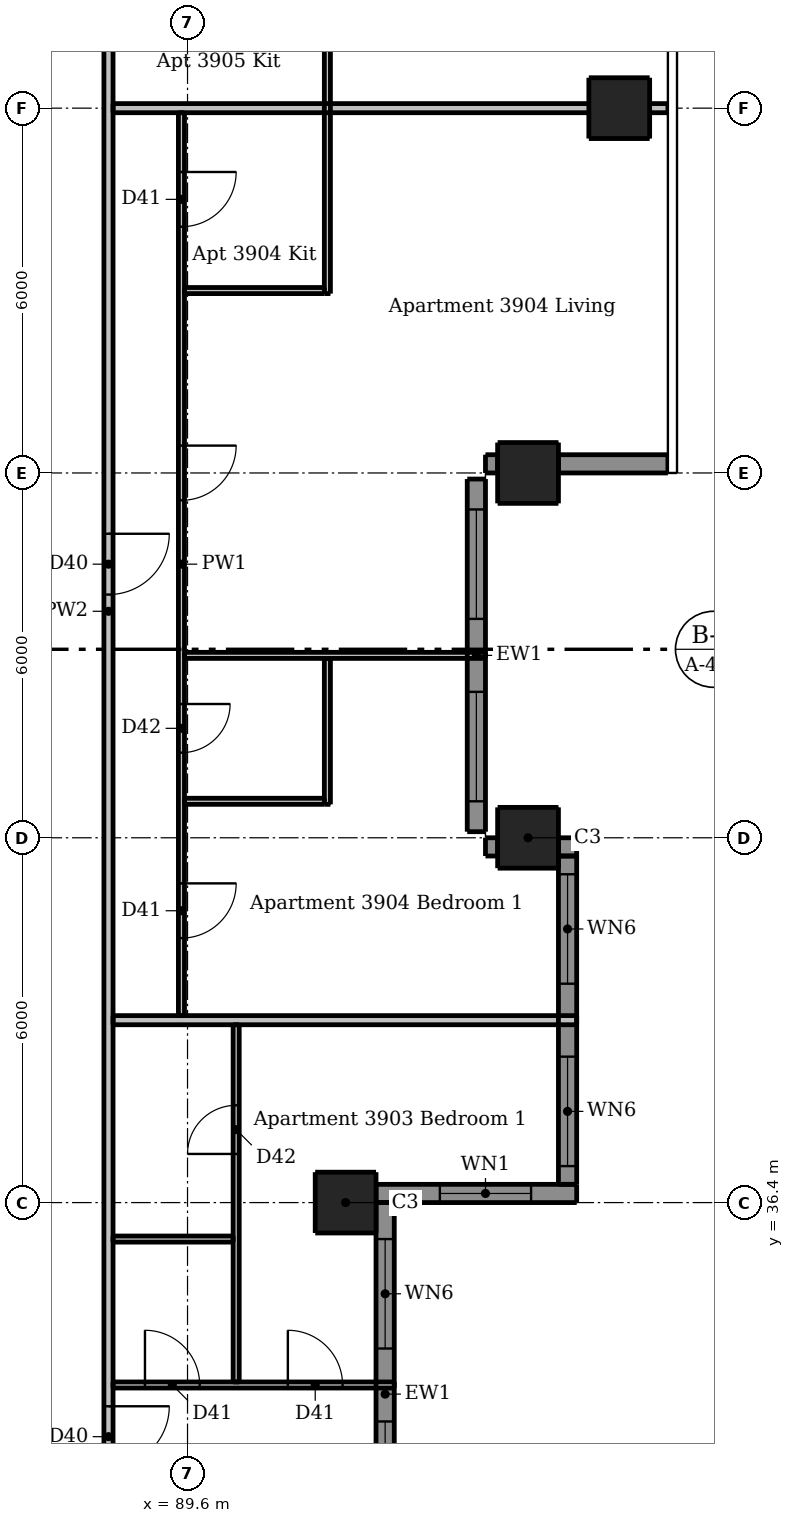
"""IFC4 building model, lengths in metres.
Left out: names, types, materials, properties, quantities, classifications, styles, units other than length and angle.
Written with IfcOpenShell. Run it as: python <this file> out.ifc"""

import sys

from ifc_helpers import new_model, si_unit, direction, frame, frame_2d, origin, origin_2d, place, context, subcontext, project, spatial, rectangle, extrude, element, fill, save


model = new_model("IFC4")
c1 = context("Model", 3, precision=1e-05, world=origin(), true_north=direction((0.0, 1.0)))
c2 = subcontext(c1, "Body", "Model", "MODEL_VIEW")
j1 = project(units=[si_unit("LENGTHUNIT", "METRE"), si_unit("PLANEANGLEUNIT", "RADIAN")], contexts=[c1])
p1 = place(None, origin())
s1 = spatial("IfcSite", under=j1, at=p1, CompositionType="ELEMENT")
p2 = place(p1, origin())
s2 = spatial("IfcBuilding", under=s1, at=p2, CompositionType="ELEMENT")
p3 = place(p2, frame((0.0, 0.0, 147.1)))
s3 = spatial("IfcBuildingStorey", under=s2, at=p3, CompositionType="ELEMENT", Elevation=147.1)
p4 = place(p3, frame((92.2, 36.4, 0.0), z_axis=(0.0, 0.0, 1.0), x_axis=(1.0, 0.0, 0.0)))
e1 = element("IfcColumn", 1, at=p4, inside=s3, PredefinedType="COLUMN", context=c2, shape_type="SweptSolid", body=[
    extrude(rectangle(XDim=1.0, YDim=1.0, at=origin_2d()), origin(), (0.0, 0.0, 1.0), 3.0),
])
p5 = place(p3, frame((95.2, 42.4, 0.0), z_axis=(0.0, 0.0, 1.0), x_axis=(1.0, 0.0, 0.0)))
e2 = element("IfcColumn", 2, at=p5, inside=s3, PredefinedType="COLUMN", context=c2, shape_type="SweptSolid", body=[
    extrude(rectangle(XDim=1.0, YDim=1.0, at=origin_2d()), origin(), (0.0, 0.0, 1.0), 3.3),
])
for number, where, z_axis, x_axis in (
    (3, (95.2, 48.4, 0.0), (0.0, 0.0, 1.0), (1.0, 0.0, 0.0)),
    (4, (96.7, 54.4, 0.0), (0.0, 0.0, 1.0), (1.0, 0.0, 0.0)),
):
    element("IfcColumn", number, at=place(p3, frame(where, z_axis=z_axis, x_axis=x_axis)), inside=s3, PredefinedType="COLUMN", context=c2, shape_type="SweptSolid", body=[
        extrude(rectangle(XDim=1.0, YDim=1.0, at=origin_2d()), origin(), (0.0, 0.0, 1.0), 3.0),
    ])
p6 = place(p3, frame((92.7, 36.55, 0.0), z_axis=(0.0, 0.0, 1.0), x_axis=(1.0, 0.0, 0.0)))
e5 = element("IfcWall", 5, at=p6, inside=s3, PredefinedType="SOLIDWALL", context=c2, shape_type="SweptSolid", body=[
    extrude(rectangle(XDim=3.3, YDim=0.3, at=frame_2d((1.65, 0.0))), origin(), (0.0, 0.0, 1.0), 3.0),
])
p7 = place(p6, frame((1.05, 0.0, 0.9)))
e6 = element("IfcOpeningElement", 6, at=p7, cuts=e5, PredefinedType="OPENING", context=c2, shape_type="SweptSolid", body=[
    extrude(rectangle(XDim=1.5, YDim=1.5, at=frame_2d((0.75, 0.75))), frame((0.0, 0.16, 0.0), z_axis=(0.0, -1.0, 0.0), x_axis=(1.0, 0.0, 0.0)), (0.0, 0.0, 1.0), 0.32),
])
p8 = place(p3, frame((96.0, 42.25, 0.0), z_axis=(0.0, 0.0, 1.0), x_axis=(-1.0, 0.0, 0.0)))
e7 = element("IfcWall", 7, at=p8, inside=s3, PredefinedType="SOLIDWALL", context=c2, shape_type="SweptSolid", body=[
    extrude(rectangle(XDim=0.3, YDim=0.3, at=frame_2d((0.15, 0.0))), origin(), (0.0, 0.0, 1.0), 3.0),
])
for number, where, z_axis, x_axis in (
    (8, (94.7, 42.25, 0.0), (0.0, 0.0, 1.0), (-1.0, 0.0, 0.0)),
    (9, (94.5, 48.55, 0.0), (0.0, 0.0, 1.0), (1.0, 0.0, 0.0)),
):
    element("IfcWall", number, at=place(p3, frame(where, z_axis=z_axis, x_axis=x_axis)), inside=s3, PredefinedType="SOLIDWALL", context=c2, shape_type="SweptSolid", body=[
        extrude(rectangle(XDim=0.2, YDim=0.3, at=frame_2d((0.1, 0.0))), origin(), (0.0, 0.0, 1.0), 3.0),
    ])
p9 = place(p3, frame((95.7, 48.55, 0.0), z_axis=(0.0, 0.0, 1.0), x_axis=(1.0, 0.0, 0.0)))
e10 = element("IfcWall", 10, at=p9, inside=s3, PredefinedType="SOLIDWALL", context=c2, shape_type="SweptSolid", body=[
    extrude(rectangle(XDim=1.8, YDim=0.3, at=frame_2d((0.9, 0.0))), origin(), (0.0, 0.0, 1.0), 3.0),
])
p10 = place(p3, frame((92.85, 30.1, 0.0), z_axis=(0.0, 0.0, 1.0), x_axis=(0.0, 1.0, 0.0)))
e11 = element("IfcWall", 11, at=p10, inside=s3, PredefinedType="SOLIDWALL", context=c2, shape_type="SweptSolid", body=[
    extrude(rectangle(XDim=6.3, YDim=0.3, at=frame_2d((3.15, 0.0))), origin(), (0.0, 0.0, 1.0), 3.0),
])
p11 = place(p10, frame((0.9, 0.0, 0.15)))
e12 = element("IfcOpeningElement", 12, at=p11, cuts=e11, PredefinedType="OPENING", context=c2, shape_type="SweptSolid", body=[
    extrude(rectangle(XDim=1.8, YDim=2.1, at=frame_2d((0.9, 1.05))), frame((0.0, 0.16, 0.0), z_axis=(0.0, -1.0, 0.0), x_axis=(1.0, 0.0, 0.0)), (0.0, 0.0, 1.0), 0.32),
])
p12 = place(p10, frame((3.9, 0.0, 0.15)))
e13 = element("IfcOpeningElement", 13, at=p12, cuts=e11, PredefinedType="OPENING", context=c2, shape_type="SweptSolid", body=[
    extrude(rectangle(XDim=1.8, YDim=2.1, at=frame_2d((0.9, 1.05))), frame((0.0, 0.16, 0.0), z_axis=(0.0, -1.0, 0.0), x_axis=(1.0, 0.0, 0.0)), (0.0, 0.0, 1.0), 0.32),
])
p13 = place(p3, frame((95.85, 36.7, 0.0), z_axis=(0.0, 0.0, 1.0), x_axis=(0.0, 1.0, 0.0)))
e14 = element("IfcWall", 14, at=p13, inside=s3, PredefinedType="SOLIDWALL", context=c2, shape_type="SweptSolid", body=[
    extrude(rectangle(XDim=5.4, YDim=0.3, at=frame_2d((2.7, 0.0))), origin(), (0.0, 0.0, 1.0), 3.0),
])
p14 = place(p13, frame((0.3, 0.0, 0.15)))
e15 = element("IfcOpeningElement", 15, at=p14, cuts=e14, PredefinedType="OPENING", context=c2, shape_type="SweptSolid", body=[
    extrude(rectangle(XDim=1.8, YDim=2.1, at=frame_2d((0.9, 1.05))), frame((0.0, 0.16, 0.0), z_axis=(0.0, -1.0, 0.0), x_axis=(1.0, 0.0, 0.0)), (0.0, 0.0, 1.0), 0.32),
])
p15 = place(p13, frame((3.3, 0.0, 0.15)))
e16 = element("IfcOpeningElement", 16, at=p15, cuts=e14, PredefinedType="OPENING", context=c2, shape_type="SweptSolid", body=[
    extrude(rectangle(XDim=1.8, YDim=2.1, at=frame_2d((0.9, 1.05))), frame((0.0, 0.16, 0.0), z_axis=(0.0, -1.0, 0.0), x_axis=(1.0, 0.0, 0.0)), (0.0, 0.0, 1.0), 0.32),
])
p16 = place(p3, frame((94.35, 42.5, 0.0), z_axis=(0.0, 0.0, 1.0), x_axis=(0.0, 1.0, 0.0)))
e17 = element("IfcWall", 17, at=p16, inside=s3, PredefinedType="SOLIDWALL", context=c2, shape_type="SweptSolid", body=[
    extrude(rectangle(XDim=5.8, YDim=0.3, at=frame_2d((2.9, 0.0))), origin(), (0.0, 0.0, 1.0), 3.0),
])
p17 = place(p16, frame((0.5, 0.0, 0.15)))
e18 = element("IfcOpeningElement", 18, at=p17, cuts=e17, PredefinedType="OPENING", context=c2, shape_type="SweptSolid", body=[
    extrude(rectangle(XDim=1.8, YDim=2.1, at=frame_2d((0.9, 1.05))), frame((0.0, 0.16, 0.0), z_axis=(0.0, -1.0, 0.0), x_axis=(1.0, 0.0, 0.0)), (0.0, 0.0, 1.0), 0.32),
])
p18 = place(p16, frame((3.5, 0.0, 0.15)))
e19 = element("IfcOpeningElement", 19, at=p18, cuts=e17, PredefinedType="OPENING", context=c2, shape_type="SweptSolid", body=[
    extrude(rectangle(XDim=1.8, YDim=2.1, at=frame_2d((0.9, 1.05))), frame((0.0, 0.16, 0.0), z_axis=(0.0, -1.0, 0.0), x_axis=(1.0, 0.0, 0.0)), (0.0, 0.0, 1.0), 0.32),
])
p19 = place(p3, frame((89.5, 54.325, 0.0), z_axis=(0.0, 0.0, 1.0), x_axis=(0.0, -1.0, 0.0)))
e20 = element("IfcWall", 20, at=p19, inside=s3, PredefinedType="PARTITIONING", context=c2, shape_type="SweptSolid", body=[
    extrude(rectangle(XDim=14.85, YDim=0.1, at=frame_2d((7.425, 0.0))), origin(), (0.0, 0.0, 1.0), 3.0),
])
p20 = place(p19, frame((5.475, 0.0, 0.0)))
e21 = element("IfcOpeningElement", 21, at=p20, cuts=e20, PredefinedType="OPENING", context=c2, shape_type="SweptSolid", body=[
    extrude(rectangle(XDim=0.9, YDim=2.1, at=frame_2d((0.45, 1.05))), frame((0.0, 0.06, 0.0), z_axis=(0.0, -1.0, 0.0), x_axis=(1.0, 0.0, 0.0)), (0.0, 0.0, 1.0), 0.12),
])
p21 = place(p19, frame((0.975, 0.0, 0.0)))
e22 = element("IfcOpeningElement", 22, at=p21, cuts=e20, PredefinedType="OPENING", context=c2, shape_type="SweptSolid", body=[
    extrude(rectangle(XDim=0.9, YDim=2.1, at=frame_2d((0.45, 1.05))), frame((0.0, 0.06, 0.0), z_axis=(0.0, -1.0, 0.0), x_axis=(1.0, 0.0, 0.0)), (0.0, 0.0, 1.0), 0.12),
])
p22 = place(p19, frame((12.675, 0.0, 0.0)))
e23 = element("IfcOpeningElement", 23, at=p22, cuts=e20, PredefinedType="OPENING", context=c2, shape_type="SweptSolid", body=[
    extrude(rectangle(XDim=0.9, YDim=2.1, at=frame_2d((0.45, 1.05))), frame((0.0, 0.06, 0.0), z_axis=(0.0, -1.0, 0.0), x_axis=(1.0, 0.0, 0.0)), (0.0, 0.0, 1.0), 0.12),
])
p23 = place(p19, frame((9.725, 0.0, 0.0)))
e24 = element("IfcOpeningElement", 24, at=p23, cuts=e20, PredefinedType="OPENING", context=c2, shape_type="SweptSolid", body=[
    extrude(rectangle(XDim=0.8, YDim=2.1, at=frame_2d((0.4, 1.05))), frame((0.0, 0.06, 0.0), z_axis=(0.0, -1.0, 0.0), x_axis=(1.0, 0.0, 0.0)), (0.0, 0.0, 1.0), 0.12),
])
p24 = place(p3, frame((90.4, 33.45, 0.0), z_axis=(0.0, 0.0, 1.0), x_axis=(0.0, 1.0, 0.0)))
e25 = element("IfcWall", 25, at=p24, inside=s3, PredefinedType="PARTITIONING", context=c2, shape_type="SweptSolid", body=[
    extrude(rectangle(XDim=5.875, YDim=0.1, at=frame_2d((2.938, 0.0))), origin(), (0.0, 0.0, 1.0), 3.0),
])
p25 = place(p24, frame((3.75, 0.0, 0.0)))
e26 = element("IfcOpeningElement", 26, at=p25, cuts=e25, PredefinedType="OPENING", context=c2, shape_type="SweptSolid", body=[
    extrude(rectangle(XDim=0.8, YDim=2.1, at=frame_2d((0.4, 1.05))), frame((0.0, 0.06, 0.0), z_axis=(0.0, -1.0, 0.0), x_axis=(1.0, 0.0, 0.0)), (0.0, 0.0, 1.0), 0.12),
])
p26 = place(p3, frame((91.9, 42.95, 0.0), z_axis=(0.0, 0.0, 1.0), x_axis=(0.0, 1.0, 0.0)))
e27 = element("IfcWall", 27, at=p26, inside=s3, PredefinedType="PARTITIONING", context=c2, shape_type="SweptSolid", body=[
    extrude(rectangle(XDim=2.4, YDim=0.1, at=frame_2d((1.2, 0.0))), origin(), (0.0, 0.0, 1.0), 3.0),
])
p27 = place(p3, frame((91.9, 51.35, 0.0), z_axis=(0.0, 0.0, 1.0), x_axis=(0.0, 1.0, 0.0)))
e28 = element("IfcWall", 28, at=p27, inside=s3, PredefinedType="PARTITIONING", context=c2, shape_type="SweptSolid", body=[
    extrude(rectangle(XDim=5.2, YDim=0.1, at=frame_2d((2.6, 0.0))), origin(), (0.0, 0.0, 1.0), 3.0),
])
p28 = place(p3, frame((89.55, 51.4, 0.0), z_axis=(0.0, 0.0, 1.0), x_axis=(1.0, 0.0, 0.0)))
e29 = element("IfcWall", 29, at=p28, inside=s3, PredefinedType="PARTITIONING", context=c2, shape_type="SweptSolid", body=[
    extrude(rectangle(XDim=2.3, YDim=0.1, at=frame_2d((1.15, 0.0))), origin(), (0.0, 0.0, 1.0), 3.0),
])
p29 = place(p3, frame((89.55, 45.4, 0.0), z_axis=(0.0, 0.0, 1.0), x_axis=(1.0, 0.0, 0.0)))
e30 = element("IfcWall", 30, at=p29, inside=s3, PredefinedType="PARTITIONING", context=c2, shape_type="SweptSolid", body=[
    extrude(rectangle(XDim=4.95, YDim=0.1, at=frame_2d((2.475, 0.0))), origin(), (0.0, 0.0, 1.0), 3.0),
])
p30 = place(p3, frame((89.55, 43.0, 0.0), z_axis=(0.0, 0.0, 1.0), x_axis=(1.0, 0.0, 0.0)))
e31 = element("IfcWall", 31, at=p30, inside=s3, PredefinedType="PARTITIONING", context=c2, shape_type="SweptSolid", body=[
    extrude(rectangle(XDim=2.3, YDim=0.1, at=frame_2d((1.15, 0.0))), origin(), (0.0, 0.0, 1.0), 3.0),
])
p31 = place(p3, frame((88.375, 35.8, 0.0), z_axis=(0.0, 0.0, 1.0), x_axis=(1.0, 0.0, 0.0)))
e32 = element("IfcWall", 32, at=p31, inside=s3, PredefinedType="PARTITIONING", context=c2, shape_type="SweptSolid", body=[
    extrude(rectangle(XDim=1.975, YDim=0.1, at=frame_2d((0.988, 0.0))), origin(), (0.0, 0.0, 1.0), 3.0),
])
p32 = place(p3, frame((88.375, 33.4, 0.0), z_axis=(0.0, 0.0, 1.0), x_axis=(1.0, 0.0, 0.0)))
e33 = element("IfcWall", 33, at=p32, inside=s3, PredefinedType="PARTITIONING", context=c2, shape_type="SweptSolid", body=[
    extrude(rectangle(XDim=4.625, YDim=0.1, at=frame_2d((2.312, 0.0))), origin(), (0.0, 0.0, 1.0), 3.0),
])
p33 = place(p32, frame((0.525, 0.0, 0.0)))
e34 = element("IfcOpeningElement", 34, at=p33, cuts=e33, PredefinedType="OPENING", context=c2, shape_type="SweptSolid", body=[
    extrude(rectangle(XDim=0.9, YDim=2.1, at=frame_2d((0.45, 1.05))), frame((0.0, 0.06, 0.0), z_axis=(0.0, -1.0, 0.0), x_axis=(1.0, 0.0, 0.0)), (0.0, 0.0, 1.0), 0.12),
])
p34 = place(p32, frame((2.875, 0.0, 0.0)))
e35 = element("IfcOpeningElement", 35, at=p34, cuts=e33, PredefinedType="OPENING", context=c2, shape_type="SweptSolid", body=[
    extrude(rectangle(XDim=0.9, YDim=2.1, at=frame_2d((0.45, 1.05))), frame((0.0, 0.06, 0.0), z_axis=(0.0, -1.0, 0.0), x_axis=(1.0, 0.0, 0.0)), (0.0, 0.0, 1.0), 0.12),
])
p35 = place(p3, frame((88.3, 60.475, 0.0), z_axis=(0.0, 0.0, 1.0), x_axis=(0.0, -1.0, 0.0)))
e36 = element("IfcWall", 36, at=p35, inside=s3, PredefinedType="PARTITIONING", context=c2, shape_type="SweptSolid", body=[
    extrude(rectangle(XDim=28.7, YDim=0.15, at=frame_2d((14.35, 0.0))), origin(), (0.0, 0.0, 1.0), 3.0),
])
p36 = place(p35, frame((27.425, 0.0, 0.0)))
e37 = element("IfcOpeningElement", 37, at=p36, cuts=e36, PredefinedType="OPENING", context=c2, shape_type="SweptSolid", body=[
    extrude(rectangle(XDim=1.0, YDim=2.1, at=frame_2d((0.5, 1.05))), frame((0.0, 0.085, 0.0), z_axis=(0.0, -1.0, 0.0), x_axis=(1.0, 0.0, 0.0)), (0.0, 0.0, 1.0), 0.17),
])
p37 = place(p35, frame((13.075, 0.0, 0.0)))
e38 = element("IfcOpeningElement", 38, at=p37, cuts=e36, PredefinedType="OPENING", context=c2, shape_type="SweptSolid", body=[
    extrude(rectangle(XDim=1.0, YDim=2.1, at=frame_2d((0.5, 1.05))), frame((0.0, 0.085, 0.0), z_axis=(0.0, -1.0, 0.0), x_axis=(1.0, 0.0, 0.0)), (0.0, 0.0, 1.0), 0.17),
])
p38 = place(p35, frame((2.575, 0.0, 0.0)))
e39 = element("IfcOpeningElement", 39, at=p38, cuts=e36, PredefinedType="OPENING", context=c2, shape_type="SweptSolid", body=[
    extrude(rectangle(XDim=1.0, YDim=2.1, at=frame_2d((0.5, 1.05))), frame((0.0, 0.085, 0.0), z_axis=(0.0, -1.0, 0.0), x_axis=(1.0, 0.0, 0.0)), (0.0, 0.0, 1.0), 0.17),
])
p39 = place(p3, frame((88.375, 54.4, 0.0), z_axis=(0.0, 0.0, 1.0), x_axis=(1.0, 0.0, 0.0)))
e40 = element("IfcWall", 40, at=p39, inside=s3, PredefinedType="PARTITIONING", context=c2, shape_type="SweptSolid", body=[
    extrude(rectangle(XDim=9.125, YDim=0.15, at=frame_2d((4.562, 0.0))), origin(), (0.0, 0.0, 1.0), 2.466),
])
p40 = place(p3, frame((88.375, 39.4, 0.0), z_axis=(0.0, 0.0, 1.0), x_axis=(1.0, 0.0, 0.0)))
e41 = element("IfcWall", 41, at=p40, inside=s3, PredefinedType="PARTITIONING", context=c2, shape_type="SweptSolid", body=[
    extrude(rectangle(XDim=7.625, YDim=0.15, at=frame_2d((3.812, 0.0))), origin(), (0.0, 0.0, 1.0), 3.0),
])
p41 = place(p7, origin())
e42 = element("IfcWindow", 42, at=p41, inside=s3, PartitioningType="DOUBLE_PANEL_VERTICAL", PredefinedType="WINDOW", context=c2, shape_type="SweptSolid", body=[
    extrude(rectangle(XDim=1.5, YDim=1.5, at=frame_2d((0.75, 0.75))), frame((0.0, 0.03, 0.0), z_axis=(0.0, -1.0, 0.0), x_axis=(1.0, 0.0, 0.0)), (0.0, 0.0, 1.0), 0.06),
])
fill(e6, e42)
p42 = place(p11, origin())
e43 = element("IfcWindow", 43, at=p42, inside=s3, PartitioningType="DOUBLE_PANEL_VERTICAL", PredefinedType="WINDOW", context=c2, shape_type="SweptSolid", body=[
    extrude(rectangle(XDim=1.8, YDim=2.1, at=frame_2d((0.9, 1.05))), frame((0.0, 0.03, 0.0), z_axis=(0.0, -1.0, 0.0), x_axis=(1.0, 0.0, 0.0)), (0.0, 0.0, 1.0), 0.06),
])
fill(e12, e43)
p43 = place(p12, origin())
e44 = element("IfcWindow", 44, at=p43, inside=s3, PartitioningType="DOUBLE_PANEL_VERTICAL", PredefinedType="WINDOW", context=c2, shape_type="SweptSolid", body=[
    extrude(rectangle(XDim=1.8, YDim=2.1, at=frame_2d((0.9, 1.05))), frame((0.0, 0.03, 0.0), z_axis=(0.0, -1.0, 0.0), x_axis=(1.0, 0.0, 0.0)), (0.0, 0.0, 1.0), 0.06),
])
fill(e13, e44)
p44 = place(p14, origin())
e45 = element("IfcWindow", 45, at=p44, inside=s3, PartitioningType="DOUBLE_PANEL_VERTICAL", PredefinedType="WINDOW", context=c2, shape_type="SweptSolid", body=[
    extrude(rectangle(XDim=1.8, YDim=2.1, at=frame_2d((0.9, 1.05))), frame((0.0, 0.03, 0.0), z_axis=(0.0, -1.0, 0.0), x_axis=(1.0, 0.0, 0.0)), (0.0, 0.0, 1.0), 0.06),
])
fill(e15, e45)
p45 = place(p15, origin())
e46 = element("IfcWindow", 46, at=p45, inside=s3, PartitioningType="DOUBLE_PANEL_VERTICAL", PredefinedType="WINDOW", context=c2, shape_type="SweptSolid", body=[
    extrude(rectangle(XDim=1.8, YDim=2.1, at=frame_2d((0.9, 1.05))), frame((0.0, 0.03, 0.0), z_axis=(0.0, -1.0, 0.0), x_axis=(1.0, 0.0, 0.0)), (0.0, 0.0, 1.0), 0.06),
])
fill(e16, e46)
p46 = place(p17, origin())
e47 = element("IfcWindow", 47, at=p46, inside=s3, PartitioningType="DOUBLE_PANEL_VERTICAL", PredefinedType="WINDOW", context=c2, shape_type="SweptSolid", body=[
    extrude(rectangle(XDim=1.8, YDim=2.1, at=frame_2d((0.9, 1.05))), frame((0.0, 0.03, 0.0), z_axis=(0.0, -1.0, 0.0), x_axis=(1.0, 0.0, 0.0)), (0.0, 0.0, 1.0), 0.06),
])
fill(e18, e47)
p47 = place(p18, origin())
e48 = element("IfcWindow", 48, at=p47, inside=s3, PartitioningType="DOUBLE_PANEL_VERTICAL", PredefinedType="WINDOW", context=c2, shape_type="SweptSolid", body=[
    extrude(rectangle(XDim=1.8, YDim=2.1, at=frame_2d((0.9, 1.05))), frame((0.0, 0.03, 0.0), z_axis=(0.0, -1.0, 0.0), x_axis=(1.0, 0.0, 0.0)), (0.0, 0.0, 1.0), 0.06),
])
fill(e19, e48)
p48 = place(p36, origin())
e49 = element("IfcDoor", 49, at=p48, inside=s3, OperationType="SINGLE_SWING_LEFT", PredefinedType="DOOR", context=c2, shape_type="SweptSolid", body=[
    extrude(rectangle(XDim=1.0, YDim=2.1, at=frame_2d((0.5, 1.05))), frame((0.0, 0.025, 0.0), z_axis=(0.0, -1.0, 0.0), x_axis=(1.0, 0.0, 0.0)), (0.0, 0.0, 1.0), 0.05),
])
fill(e37, e49)
p49 = place(p33, origin())
e50 = element("IfcDoor", 50, at=p49, inside=s3, OperationType="SINGLE_SWING_LEFT", PredefinedType="DOOR", context=c2, shape_type="SweptSolid", body=[
    extrude(rectangle(XDim=0.9, YDim=2.1, at=frame_2d((0.45, 1.05))), frame((0.0, 0.025, 0.0), z_axis=(0.0, -1.0, 0.0), x_axis=(1.0, 0.0, 0.0)), (0.0, 0.0, 1.0), 0.05),
])
fill(e34, e50)
p50 = place(p34, origin())
e51 = element("IfcDoor", 51, at=p50, inside=s3, OperationType="SINGLE_SWING_LEFT", PredefinedType="DOOR", context=c2, shape_type="SweptSolid", body=[
    extrude(rectangle(XDim=0.9, YDim=2.1, at=frame_2d((0.45, 1.05))), frame((0.0, 0.025, 0.0), z_axis=(0.0, -1.0, 0.0), x_axis=(1.0, 0.0, 0.0)), (0.0, 0.0, 1.0), 0.05),
])
fill(e35, e51)
p51 = place(p25, origin())
e52 = element("IfcDoor", 52, at=p51, inside=s3, OperationType="SINGLE_SWING_LEFT", PredefinedType="DOOR", context=c2, shape_type="SweptSolid", body=[
    extrude(rectangle(XDim=0.8, YDim=2.1, at=frame_2d((0.4, 1.05))), frame((0.0, 0.025, 0.0), z_axis=(0.0, -1.0, 0.0), x_axis=(1.0, 0.0, 0.0)), (0.0, 0.0, 1.0), 0.05),
])
fill(e26, e52)
p52 = place(p37, origin())
e53 = element("IfcDoor", 53, at=p52, inside=s3, OperationType="SINGLE_SWING_LEFT", PredefinedType="DOOR", context=c2, shape_type="SweptSolid", body=[
    extrude(rectangle(XDim=1.0, YDim=2.1, at=frame_2d((0.5, 1.05))), frame((0.0, 0.025, 0.0), z_axis=(0.0, -1.0, 0.0), x_axis=(1.0, 0.0, 0.0)), (0.0, 0.0, 1.0), 0.05),
])
fill(e38, e53)
p53 = place(p20, origin())
e54 = element("IfcDoor", 54, at=p53, inside=s3, OperationType="SINGLE_SWING_LEFT", PredefinedType="DOOR", context=c2, shape_type="SweptSolid", body=[
    extrude(rectangle(XDim=0.9, YDim=2.1, at=frame_2d((0.45, 1.05))), frame((0.0, 0.025, 0.0), z_axis=(0.0, -1.0, 0.0), x_axis=(1.0, 0.0, 0.0)), (0.0, 0.0, 1.0), 0.05),
])
fill(e21, e54)
p54 = place(p21, origin())
e55 = element("IfcDoor", 55, at=p54, inside=s3, OperationType="SINGLE_SWING_LEFT", PredefinedType="DOOR", context=c2, shape_type="SweptSolid", body=[
    extrude(rectangle(XDim=0.9, YDim=2.1, at=frame_2d((0.45, 1.05))), frame((0.0, 0.025, 0.0), z_axis=(0.0, -1.0, 0.0), x_axis=(1.0, 0.0, 0.0)), (0.0, 0.0, 1.0), 0.05),
])
fill(e22, e55)
p55 = place(p22, origin())
e56 = element("IfcDoor", 56, at=p55, inside=s3, OperationType="SINGLE_SWING_LEFT", PredefinedType="DOOR", context=c2, shape_type="SweptSolid", body=[
    extrude(rectangle(XDim=0.9, YDim=2.1, at=frame_2d((0.45, 1.05))), frame((0.0, 0.025, 0.0), z_axis=(0.0, -1.0, 0.0), x_axis=(1.0, 0.0, 0.0)), (0.0, 0.0, 1.0), 0.05),
])
fill(e23, e56)
p56 = place(p23, origin())
e57 = element("IfcDoor", 57, at=p56, inside=s3, OperationType="SINGLE_SWING_LEFT", PredefinedType="DOOR", context=c2, shape_type="SweptSolid", body=[
    extrude(rectangle(XDim=0.8, YDim=2.1, at=frame_2d((0.4, 1.05))), frame((0.0, 0.025, 0.0), z_axis=(0.0, -1.0, 0.0), x_axis=(1.0, 0.0, 0.0)), (0.0, 0.0, 1.0), 0.05),
])
fill(e24, e57)
save(model, sys.argv[1])
